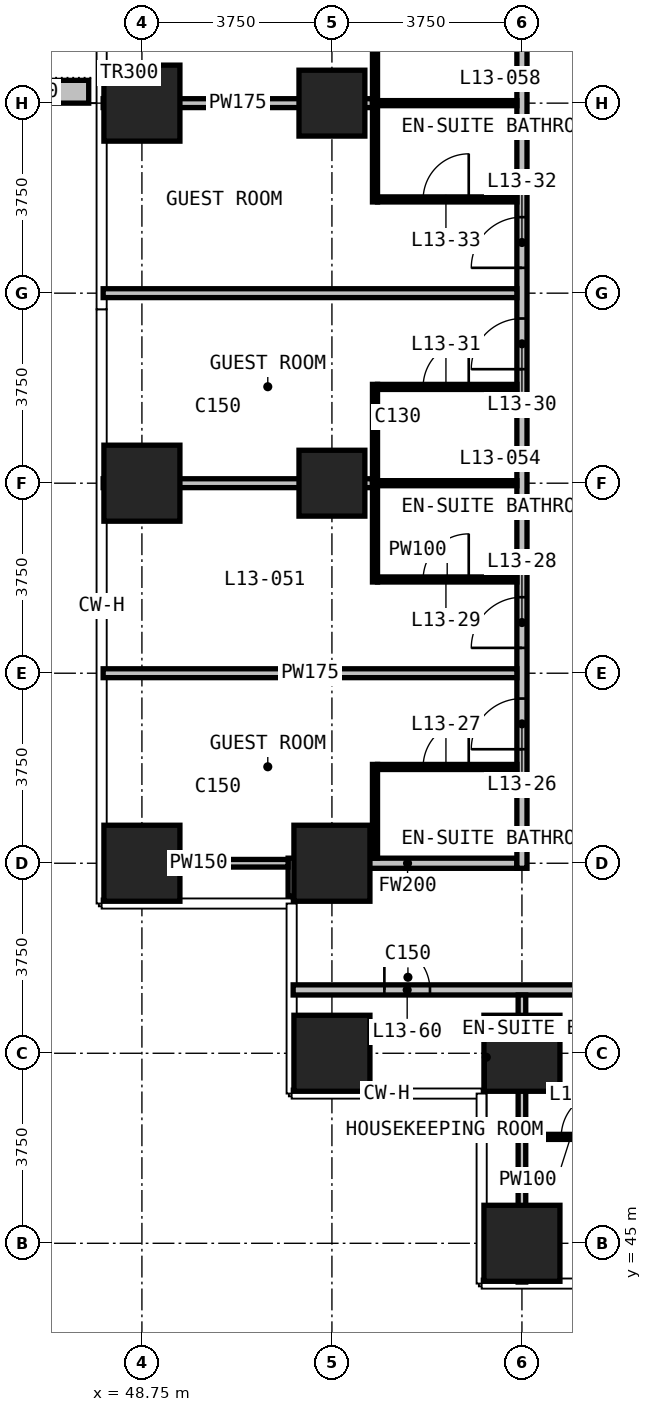
"""IFC4 building model, lengths in metres.
Left out: names, types, materials, properties, quantities, classifications, styles, units other than length and angle.
Written with IfcOpenShell. Run it as: python <this file> out.ifc"""

import sys

from ifc_helpers import new_model, si_unit, direction, frame, frame_2d, origin, origin_2d, place, context, subcontext, project, spatial, rectangle, extrude, element, fill, save


model = new_model("IFC4")
c1 = context("Model", 3, precision=1e-05, world=origin(), true_north=direction((0.0, 1.0)))
c2 = subcontext(c1, "Body", "Model", "MODEL_VIEW")
j1 = project(units=[si_unit("LENGTHUNIT", "METRE"), si_unit("PLANEANGLEUNIT", "RADIAN")], contexts=[c1])
p1 = place(None, origin())
s1 = spatial("IfcSite", under=j1, at=p1, CompositionType="ELEMENT")
p2 = place(p1, origin())
s2 = spatial("IfcBuilding", under=s1, at=p2, CompositionType="ELEMENT")
p3 = place(p2, frame((0.0, 0.0, 62.6)))
s3 = spatial("IfcBuildingStorey", under=s2, at=p3, CompositionType="ELEMENT", Elevation=62.6)
for number, where, z_axis, x_axis in (
    (1, (48.75, 52.5, 0.0), (0.0, 0.0, 1.0), (1.0, 0.0, 0.0)),
    (2, (48.75, 60.0, 0.0), (0.0, 0.0, 1.0), (1.0, 0.0, 0.0)),
    (3, (48.75, 67.5, 0.0), (0.0, 0.0, 1.0), (1.0, 0.0, 0.0)),
    (4, (52.5, 48.75, 0.0), (0.0, 0.0, 1.0), (1.0, 0.0, 0.0)),
    (5, (52.5, 52.5, 0.0), (0.0, 0.0, 1.0), (1.0, 0.0, 0.0)),
):
    element("IfcColumn", number, at=place(p3, frame(where, z_axis=z_axis, x_axis=x_axis)), inside=s3, PredefinedType="COLUMN", context=c2, shape_type="SweptSolid", body=[
        extrude(rectangle(XDim=1.5, YDim=1.5, at=origin_2d()), origin(), (0.0, 0.0, 1.0), 3.3),
    ])
for number, where, z_axis, x_axis in (
    (6, (52.5, 60.0, 0.0), (0.0, 0.0, 1.0), (1.0, 0.0, 0.0)),
    (7, (52.5, 67.5, 0.0), (0.0, 0.0, 1.0), (1.0, 0.0, 0.0)),
):
    element("IfcColumn", number, at=place(p3, frame(where, z_axis=z_axis, x_axis=x_axis)), inside=s3, PredefinedType="COLUMN", context=c2, shape_type="SweptSolid", body=[
        extrude(rectangle(XDim=1.3, YDim=1.3, at=origin_2d()), origin(), (0.0, 0.0, 1.0), 3.3),
    ])
for number, where, z_axis, x_axis in (
    (8, (56.25, 45.0, 0.0), (0.0, 0.0, 1.0), (1.0, 0.0, 0.0)),
    (9, (56.25, 48.75, 0.0), (0.0, 0.0, 1.0), (1.0, 0.0, 0.0)),
):
    element("IfcColumn", number, at=place(p3, frame(where, z_axis=z_axis, x_axis=x_axis)), inside=s3, PredefinedType="COLUMN", context=c2, shape_type="SweptSolid", body=[
        extrude(rectangle(XDim=1.5, YDim=1.5, at=origin_2d()), origin(), (0.0, 0.0, 1.0), 3.3),
    ])
p4 = place(p3, frame((47.7, 67.725, 0.0), z_axis=(0.0, 0.0, 1.0), x_axis=(-1.0, 0.0, 0.0)))
e10 = element("IfcWall", 10, at=p4, inside=s3, PredefinedType="USERDEFINED", context=c2, shape_type="SweptSolid", body=[
    extrude(rectangle(XDim=2.35, YDim=0.45, at=frame_2d((1.175, 0.0))), origin(), (0.0, 0.0, 1.0), 1.1),
])
p5 = place(p3, frame((51.735, 50.0, 0.0), z_axis=(0.0, 0.0, 1.0), x_axis=(1.0, 0.0, 0.0)))
e11 = element("IfcWall", 11, at=p5, inside=s3, PredefinedType="PARTITIONING", context=c2, shape_type="SweptSolid", body=[
    extrude(rectangle(XDim=46.53, YDim=0.2, at=frame_2d((23.265, 0.0))), origin(), (0.0, 0.0, 1.0), 3.0),
])
p6 = place(p5, frame((6.765, 0.0, 0.0)))
e12 = element("IfcOpeningElement", 12, at=p6, cuts=e11, PredefinedType="OPENING", context=c2, shape_type="SweptSolid", body=[
    extrude(rectangle(XDim=1.0, YDim=2.2, at=frame_2d((0.5, 1.1))), frame((0.0, 0.11, 0.0), z_axis=(0.0, -1.0, 0.0), x_axis=(1.0, 0.0, 0.0)), (0.0, 0.0, 1.0), 0.22),
])
p7 = place(p5, frame((10.515, 0.0, 0.0)))
e13 = element("IfcOpeningElement", 13, at=p7, cuts=e11, PredefinedType="OPENING", context=c2, shape_type="SweptSolid", body=[
    extrude(rectangle(XDim=1.0, YDim=2.2, at=frame_2d((0.5, 1.1))), frame((0.0, 0.11, 0.0), z_axis=(0.0, -1.0, 0.0), x_axis=(1.0, 0.0, 0.0)), (0.0, 0.0, 1.0), 0.22),
])
p8 = place(p5, frame((12.515, 0.0, 0.0)))
e14 = element("IfcOpeningElement", 14, at=p8, cuts=e11, PredefinedType="OPENING", context=c2, shape_type="SweptSolid", body=[
    extrude(rectangle(XDim=1.0, YDim=2.2, at=frame_2d((0.5, 1.1))), frame((0.0, 0.11, 0.0), z_axis=(0.0, -1.0, 0.0), x_axis=(1.0, 0.0, 0.0)), (0.0, 0.0, 1.0), 0.22),
])
p9 = place(p5, frame((18.015, 0.0, 0.0)))
e15 = element("IfcOpeningElement", 15, at=p9, cuts=e11, PredefinedType="OPENING", context=c2, shape_type="SweptSolid", body=[
    extrude(rectangle(XDim=1.0, YDim=2.2, at=frame_2d((0.5, 1.1))), frame((0.0, 0.11, 0.0), z_axis=(0.0, -1.0, 0.0), x_axis=(1.0, 0.0, 0.0)), (0.0, 0.0, 1.0), 0.22),
])
p10 = place(p5, frame((20.015, 0.0, 0.0)))
e16 = element("IfcOpeningElement", 16, at=p10, cuts=e11, PredefinedType="OPENING", context=c2, shape_type="SweptSolid", body=[
    extrude(rectangle(XDim=1.0, YDim=2.2, at=frame_2d((0.5, 1.1))), frame((0.0, 0.11, 0.0), z_axis=(0.0, -1.0, 0.0), x_axis=(1.0, 0.0, 0.0)), (0.0, 0.0, 1.0), 0.22),
])
p11 = place(p5, frame((25.515, 0.0, 0.0)))
e17 = element("IfcOpeningElement", 17, at=p11, cuts=e11, PredefinedType="OPENING", context=c2, shape_type="SweptSolid", body=[
    extrude(rectangle(XDim=1.0, YDim=2.2, at=frame_2d((0.5, 1.1))), frame((0.0, 0.11, 0.0), z_axis=(0.0, -1.0, 0.0), x_axis=(1.0, 0.0, 0.0)), (0.0, 0.0, 1.0), 0.22),
])
p12 = place(p5, frame((27.515, 0.0, 0.0)))
e18 = element("IfcOpeningElement", 18, at=p12, cuts=e11, PredefinedType="OPENING", context=c2, shape_type="SweptSolid", body=[
    extrude(rectangle(XDim=1.0, YDim=2.2, at=frame_2d((0.5, 1.1))), frame((0.0, 0.11, 0.0), z_axis=(0.0, -1.0, 0.0), x_axis=(1.0, 0.0, 0.0)), (0.0, 0.0, 1.0), 0.22),
])
p13 = place(p5, frame((33.015, 0.0, 0.0)))
e19 = element("IfcOpeningElement", 19, at=p13, cuts=e11, PredefinedType="OPENING", context=c2, shape_type="SweptSolid", body=[
    extrude(rectangle(XDim=1.0, YDim=2.2, at=frame_2d((0.5, 1.1))), frame((0.0, 0.11, 0.0), z_axis=(0.0, -1.0, 0.0), x_axis=(1.0, 0.0, 0.0)), (0.0, 0.0, 1.0), 0.22),
])
p14 = place(p5, frame((35.015, 0.0, 0.0)))
e20 = element("IfcOpeningElement", 20, at=p14, cuts=e11, PredefinedType="OPENING", context=c2, shape_type="SweptSolid", body=[
    extrude(rectangle(XDim=1.0, YDim=2.2, at=frame_2d((0.5, 1.1))), frame((0.0, 0.11, 0.0), z_axis=(0.0, -1.0, 0.0), x_axis=(1.0, 0.0, 0.0)), (0.0, 0.0, 1.0), 0.22),
])
p15 = place(p5, frame((38.765, 0.0, 0.0)))
e21 = element("IfcOpeningElement", 21, at=p15, cuts=e11, PredefinedType="OPENING", context=c2, shape_type="SweptSolid", body=[
    extrude(rectangle(XDim=1.0, YDim=2.2, at=frame_2d((0.5, 1.1))), frame((0.0, 0.11, 0.0), z_axis=(0.0, -1.0, 0.0), x_axis=(1.0, 0.0, 0.0)), (0.0, 0.0, 1.0), 0.22),
])
p16 = place(p5, frame((1.8, 0.0, 0.0)))
e22 = element("IfcOpeningElement", 22, at=p16, cuts=e11, PredefinedType="OPENING", context=c2, shape_type="SweptSolid", body=[
    extrude(rectangle(XDim=0.9, YDim=2.2, at=frame_2d((0.45, 1.1))), frame((0.0, 0.11, 0.0), z_axis=(0.0, -1.0, 0.0), x_axis=(1.0, 0.0, 0.0)), (0.0, 0.0, 1.0), 0.22),
])
p17 = place(p5, frame((43.815, 0.0, 0.0)))
e23 = element("IfcOpeningElement", 23, at=p17, cuts=e11, PredefinedType="OPENING", context=c2, shape_type="SweptSolid", body=[
    extrude(rectangle(XDim=0.9, YDim=2.2, at=frame_2d((0.45, 1.1))), frame((0.0, 0.11, 0.0), z_axis=(0.0, -1.0, 0.0), x_axis=(1.0, 0.0, 0.0)), (0.0, 0.0, 1.0), 0.22),
])
p18 = place(p3, frame((51.835, 52.5, 0.0), z_axis=(0.0, 0.0, 1.0), x_axis=(1.0, 0.0, 0.0)))
e24 = element("IfcWall", 24, at=p18, inside=s3, PredefinedType="PARTITIONING", context=c2, shape_type="SweptSolid", body=[
    extrude(rectangle(XDim=4.315, YDim=0.2, at=frame_2d((2.157, 0.0))), origin(), (0.0, 0.0, 1.0), 3.0),
])
p19 = place(p3, frame((51.735, 51.855, 0.0), z_axis=(0.0, 0.0, 1.0), x_axis=(0.0, 1.0, 0.0)))
e25 = element("IfcWall", 25, at=p19, inside=s3, PredefinedType="PARTITIONING", context=c2, shape_type="SweptSolid", body=[
    extrude(rectangle(XDim=0.745, YDim=0.2, at=frame_2d((0.373, 0.0))), origin(), (0.0, 0.0, 1.0), 3.0),
])
p20 = place(p3, frame((56.25, 52.4, 0.0), z_axis=(0.0, 0.0, 1.0), x_axis=(0.0, 1.0, 0.0)))
e26 = element("IfcWall", 26, at=p20, inside=s3, PredefinedType="PARTITIONING", context=c2, shape_type="SweptSolid", body=[
    extrude(rectangle(XDim=33.925, YDim=0.2, at=frame_2d((16.962, 0.0))), origin(), (0.0, 0.0, 1.0), 3.0),
])
p21 = place(p20, frame((2.35, 0.0, 0.0)))
e27 = element("IfcOpeningElement", 27, at=p21, cuts=e26, PredefinedType="OPENING", context=c2, shape_type="SweptSolid", body=[
    extrude(rectangle(XDim=1.0, YDim=2.2, at=frame_2d((0.5, 1.1))), frame((0.0, 0.11, 0.0), z_axis=(0.0, -1.0, 0.0), x_axis=(1.0, 0.0, 0.0)), (0.0, 0.0, 1.0), 0.22),
])
p22 = place(p20, frame((4.35, 0.0, 0.0)))
e28 = element("IfcOpeningElement", 28, at=p22, cuts=e26, PredefinedType="OPENING", context=c2, shape_type="SweptSolid", body=[
    extrude(rectangle(XDim=1.0, YDim=2.2, at=frame_2d((0.5, 1.1))), frame((0.0, 0.11, 0.0), z_axis=(0.0, -1.0, 0.0), x_axis=(1.0, 0.0, 0.0)), (0.0, 0.0, 1.0), 0.22),
])
p23 = place(p20, frame((9.85, 0.0, 0.0)))
e29 = element("IfcOpeningElement", 29, at=p23, cuts=e26, PredefinedType="OPENING", context=c2, shape_type="SweptSolid", body=[
    extrude(rectangle(XDim=1.0, YDim=2.2, at=frame_2d((0.5, 1.1))), frame((0.0, 0.11, 0.0), z_axis=(0.0, -1.0, 0.0), x_axis=(1.0, 0.0, 0.0)), (0.0, 0.0, 1.0), 0.22),
])
p24 = place(p20, frame((11.85, 0.0, 0.0)))
e30 = element("IfcOpeningElement", 30, at=p24, cuts=e26, PredefinedType="OPENING", context=c2, shape_type="SweptSolid", body=[
    extrude(rectangle(XDim=1.0, YDim=2.2, at=frame_2d((0.5, 1.1))), frame((0.0, 0.11, 0.0), z_axis=(0.0, -1.0, 0.0), x_axis=(1.0, 0.0, 0.0)), (0.0, 0.0, 1.0), 0.22),
])
p25 = place(p20, frame((17.35, 0.0, 0.0)))
e31 = element("IfcOpeningElement", 31, at=p25, cuts=e26, PredefinedType="OPENING", context=c2, shape_type="SweptSolid", body=[
    extrude(rectangle(XDim=1.0, YDim=2.2, at=frame_2d((0.5, 1.1))), frame((0.0, 0.11, 0.0), z_axis=(0.0, -1.0, 0.0), x_axis=(1.0, 0.0, 0.0)), (0.0, 0.0, 1.0), 0.22),
])
p26 = place(p20, frame((19.35, 0.0, 0.0)))
e32 = element("IfcOpeningElement", 32, at=p26, cuts=e26, PredefinedType="OPENING", context=c2, shape_type="SweptSolid", body=[
    extrude(rectangle(XDim=1.0, YDim=2.2, at=frame_2d((0.5, 1.1))), frame((0.0, 0.11, 0.0), z_axis=(0.0, -1.0, 0.0), x_axis=(1.0, 0.0, 0.0)), (0.0, 0.0, 1.0), 0.22),
])
p27 = place(p20, frame((24.85, 0.0, 0.0)))
e33 = element("IfcOpeningElement", 33, at=p27, cuts=e26, PredefinedType="OPENING", context=c2, shape_type="SweptSolid", body=[
    extrude(rectangle(XDim=1.0, YDim=2.2, at=frame_2d((0.5, 1.1))), frame((0.0, 0.11, 0.0), z_axis=(0.0, -1.0, 0.0), x_axis=(1.0, 0.0, 0.0)), (0.0, 0.0, 1.0), 0.22),
])
p28 = place(p20, frame((26.85, 0.0, 0.0)))
e34 = element("IfcOpeningElement", 34, at=p28, cuts=e26, PredefinedType="OPENING", context=c2, shape_type="SweptSolid", body=[
    extrude(rectangle(XDim=1.0, YDim=2.2, at=frame_2d((0.5, 1.1))), frame((0.0, 0.11, 0.0), z_axis=(0.0, -1.0, 0.0), x_axis=(1.0, 0.0, 0.0)), (0.0, 0.0, 1.0), 0.22),
])
p29 = place(p20, frame((31.55, 0.0, 0.0)))
e35 = element("IfcOpeningElement", 35, at=p29, cuts=e26, PredefinedType="OPENING", context=c2, shape_type="SweptSolid", body=[
    extrude(rectangle(XDim=0.9, YDim=2.2, at=frame_2d((0.45, 1.1))), frame((0.0, 0.11, 0.0), z_axis=(0.0, -1.0, 0.0), x_axis=(1.0, 0.0, 0.0)), (0.0, 0.0, 1.0), 0.22),
])
p30 = place(p3, frame((47.985, 56.25, 0.0), z_axis=(0.0, 0.0, 1.0), x_axis=(1.0, 0.0, 0.0)))
e36 = element("IfcWall", 36, at=p30, inside=s3, PredefinedType="PARTITIONING", context=c2, shape_type="SweptSolid", body=[
    extrude(rectangle(XDim=8.165, YDim=0.175, at=frame_2d((4.083, 0.0))), origin(), (0.0, 0.0, 1.0), 3.0),
])
p31 = place(p3, frame((47.985, 60.0, 0.0), z_axis=(0.0, 0.0, 1.0), x_axis=(1.0, 0.0, 0.0)))
e37 = element("IfcWall", 37, at=p31, inside=s3, PredefinedType="PARTITIONING", context=c2, shape_type="SweptSolid", body=[
    extrude(rectangle(XDim=5.315, YDim=0.175, at=frame_2d((2.657, 0.0))), origin(), (0.0, 0.0, 1.0), 3.0),
])
p32 = place(p3, frame((47.985, 63.75, 0.0), z_axis=(0.0, 0.0, 1.0), x_axis=(1.0, 0.0, 0.0)))
e38 = element("IfcWall", 38, at=p32, inside=s3, PredefinedType="PARTITIONING", context=c2, shape_type="SweptSolid", body=[
    extrude(rectangle(XDim=8.165, YDim=0.175, at=frame_2d((4.083, 0.0))), origin(), (0.0, 0.0, 1.0), 3.0),
])
p33 = place(p3, frame((47.985, 67.5, 0.0), z_axis=(0.0, 0.0, 1.0), x_axis=(1.0, 0.0, 0.0)))
e39 = element("IfcWall", 39, at=p33, inside=s3, PredefinedType="PARTITIONING", context=c2, shape_type="SweptSolid", body=[
    extrude(rectangle(XDim=5.315, YDim=0.175, at=frame_2d((2.657, 0.0))), origin(), (0.0, 0.0, 1.0), 3.0),
])
p34 = place(p3, frame((48.105, 52.5, 0.0), z_axis=(0.0, 0.0, 1.0), x_axis=(1.0, 0.0, 0.0)))
e40 = element("IfcWall", 40, at=p34, inside=s3, PredefinedType="PARTITIONING", context=c2, shape_type="SweptSolid", body=[
    extrude(rectangle(XDim=3.53, YDim=0.15, at=frame_2d((1.765, 0.0))), origin(), (0.0, 0.0, 1.0), 3.0),
])
p35 = place(p3, frame((56.25, 44.235, 0.0), z_axis=(0.0, 0.0, 1.0), x_axis=(0.0, 1.0, 0.0)))
e41 = element("IfcWall", 41, at=p35, inside=s3, PredefinedType="PARTITIONING", context=c2, shape_type="SweptSolid", body=[
    extrude(rectangle(XDim=5.665, YDim=0.15, at=frame_2d((2.833, 0.0))), origin(), (0.0, 0.0, 1.0), 3.0),
])
p36 = place(p3, frame((56.325, 47.1, 0.0), z_axis=(0.0, 0.0, 1.0), x_axis=(1.0, 0.0, 0.0)))
e42 = element("IfcWall", 42, at=p36, inside=s3, PredefinedType="PARTITIONING", context=c2, shape_type="SweptSolid", body=[
    extrude(rectangle(XDim=1.775, YDim=0.1, at=frame_2d((0.888, 0.0))), origin(), (0.0, 0.0, 1.0), 3.0),
])
p37 = place(p36, frame((0.7, 0.0, 0.0)))
e43 = element("IfcOpeningElement", 43, at=p37, cuts=e42, PredefinedType="OPENING", context=c2, shape_type="SweptSolid", body=[
    extrude(rectangle(XDim=0.9, YDim=2.2, at=frame_2d((0.45, 1.1))), frame((0.0, 0.06, 0.0), z_axis=(0.0, -1.0, 0.0), x_axis=(1.0, 0.0, 0.0)), (0.0, 0.0, 1.0), 0.12),
])
p38 = place(p3, frame((53.4, 54.4, 0.0), z_axis=(0.0, 0.0, 1.0), x_axis=(1.0, 0.0, 0.0)))
e44 = element("IfcWall", 44, at=p38, inside=s3, PredefinedType="PARTITIONING", context=c2, shape_type="SweptSolid", body=[
    extrude(rectangle(XDim=2.75, YDim=0.1, at=frame_2d((1.375, 0.0))), origin(), (0.0, 0.0, 1.0), 3.0),
])
p39 = place(p38, frame((0.9, 0.0, 0.0)))
e45 = element("IfcOpeningElement", 45, at=p39, cuts=e44, PredefinedType="OPENING", context=c2, shape_type="SweptSolid", body=[
    extrude(rectangle(XDim=0.9, YDim=2.2, at=frame_2d((0.45, 1.1))), frame((0.0, 0.06, 0.0), z_axis=(0.0, -1.0, 0.0), x_axis=(1.0, 0.0, 0.0)), (0.0, 0.0, 1.0), 0.12),
])
p40 = place(p3, frame((53.4, 58.1, 0.0), z_axis=(0.0, 0.0, 1.0), x_axis=(1.0, 0.0, 0.0)))
e46 = element("IfcWall", 46, at=p40, inside=s3, PredefinedType="PARTITIONING", context=c2, shape_type="SweptSolid", body=[
    extrude(rectangle(XDim=2.75, YDim=0.1, at=frame_2d((1.375, 0.0))), origin(), (0.0, 0.0, 1.0), 3.0),
])
p41 = place(p40, frame((0.9, 0.0, 0.0)))
e47 = element("IfcOpeningElement", 47, at=p41, cuts=e46, PredefinedType="OPENING", context=c2, shape_type="SweptSolid", body=[
    extrude(rectangle(XDim=0.9, YDim=2.2, at=frame_2d((0.45, 1.1))), frame((0.0, 0.06, 0.0), z_axis=(0.0, -1.0, 0.0), x_axis=(1.0, 0.0, 0.0)), (0.0, 0.0, 1.0), 0.12),
])
p42 = place(p3, frame((53.4, 60.0, 0.0), z_axis=(0.0, 0.0, 1.0), x_axis=(1.0, 0.0, 0.0)))
e48 = element("IfcWall", 48, at=p42, inside=s3, PredefinedType="PARTITIONING", context=c2, shape_type="SweptSolid", body=[
    extrude(rectangle(XDim=2.75, YDim=0.1, at=frame_2d((1.375, 0.0))), origin(), (0.0, 0.0, 1.0), 3.0),
])
p43 = place(p3, frame((53.4, 61.9, 0.0), z_axis=(0.0, 0.0, 1.0), x_axis=(1.0, 0.0, 0.0)))
e49 = element("IfcWall", 49, at=p43, inside=s3, PredefinedType="PARTITIONING", context=c2, shape_type="SweptSolid", body=[
    extrude(rectangle(XDim=2.75, YDim=0.1, at=frame_2d((1.375, 0.0))), origin(), (0.0, 0.0, 1.0), 3.0),
])
p44 = place(p43, frame((0.9, 0.0, 0.0)))
e50 = element("IfcOpeningElement", 50, at=p44, cuts=e49, PredefinedType="OPENING", context=c2, shape_type="SweptSolid", body=[
    extrude(rectangle(XDim=0.9, YDim=2.2, at=frame_2d((0.45, 1.1))), frame((0.0, 0.06, 0.0), z_axis=(0.0, -1.0, 0.0), x_axis=(1.0, 0.0, 0.0)), (0.0, 0.0, 1.0), 0.12),
])
p45 = place(p3, frame((53.4, 65.6, 0.0), z_axis=(0.0, 0.0, 1.0), x_axis=(1.0, 0.0, 0.0)))
e51 = element("IfcWall", 51, at=p45, inside=s3, PredefinedType="PARTITIONING", context=c2, shape_type="SweptSolid", body=[
    extrude(rectangle(XDim=2.75, YDim=0.1, at=frame_2d((1.375, 0.0))), origin(), (0.0, 0.0, 1.0), 3.0),
])
p46 = place(p45, frame((0.9, 0.0, 0.0)))
e52 = element("IfcOpeningElement", 52, at=p46, cuts=e51, PredefinedType="OPENING", context=c2, shape_type="SweptSolid", body=[
    extrude(rectangle(XDim=0.9, YDim=2.2, at=frame_2d((0.45, 1.1))), frame((0.0, 0.06, 0.0), z_axis=(0.0, -1.0, 0.0), x_axis=(1.0, 0.0, 0.0)), (0.0, 0.0, 1.0), 0.12),
])
p47 = place(p3, frame((53.4, 67.5, 0.0), z_axis=(0.0, 0.0, 1.0), x_axis=(1.0, 0.0, 0.0)))
e53 = element("IfcWall", 53, at=p47, inside=s3, PredefinedType="PARTITIONING", context=c2, shape_type="SweptSolid", body=[
    extrude(rectangle(XDim=2.75, YDim=0.1, at=frame_2d((1.375, 0.0))), origin(), (0.0, 0.0, 1.0), 3.0),
])
p48 = place(p3, frame((53.35, 52.6, 0.0), z_axis=(0.0, 0.0, 1.0), x_axis=(0.0, 1.0, 0.0)))
e54 = element("IfcWall", 54, at=p48, inside=s3, PredefinedType="PARTITIONING", context=c2, shape_type="SweptSolid", body=[
    extrude(rectangle(XDim=1.85, YDim=0.1, at=frame_2d((0.925, 0.0))), origin(), (0.0, 0.0, 1.0), 3.0),
])
for number, where, z_axis, x_axis in (
    (55, (53.35, 58.05, 0.0), (0.0, 0.0, 1.0), (0.0, 1.0, 0.0)),
    (56, (53.35, 65.55, 0.0), (0.0, 0.0, 1.0), (0.0, 1.0, 0.0)),
):
    element("IfcWall", number, at=place(p3, frame(where, z_axis=z_axis, x_axis=x_axis)), inside=s3, PredefinedType="PARTITIONING", context=c2, shape_type="SweptSolid", body=[
        extrude(rectangle(XDim=3.9, YDim=0.1, at=frame_2d((1.95, 0.0))), origin(), (0.0, 0.0, 1.0), 3.0),
    ])
p49 = place(p37, origin())
e57 = element("IfcDoor", 57, at=p49, inside=s3, OperationType="SINGLE_SWING_RIGHT", PredefinedType="DOOR", context=c2, shape_type="SweptSolid", body=[
    extrude(rectangle(XDim=0.9, YDim=2.2, at=frame_2d((0.45, 1.1))), frame((0.0, 0.025, 0.0), z_axis=(0.0, -1.0, 0.0), x_axis=(1.0, 0.0, 0.0)), (0.0, 0.0, 1.0), 0.05),
])
fill(e43, e57)
p50 = place(p21, origin())
e58 = element("IfcDoor", 58, at=p50, inside=s3, OperationType="SINGLE_SWING_RIGHT", PredefinedType="DOOR", context=c2, shape_type="SweptSolid", body=[
    extrude(rectangle(XDim=1.0, YDim=2.2, at=frame_2d((0.5, 1.1))), frame((0.0, 0.025, 0.0), z_axis=(0.0, -1.0, 0.0), x_axis=(1.0, 0.0, 0.0)), (0.0, 0.0, 1.0), 0.05),
])
fill(e27, e58)
p51 = place(p39, origin())
e59 = element("IfcDoor", 59, at=p51, inside=s3, OperationType="SINGLE_SWING_RIGHT", PredefinedType="DOOR", context=c2, shape_type="SweptSolid", body=[
    extrude(rectangle(XDim=0.9, YDim=2.2, at=frame_2d((0.45, 1.1))), frame((0.0, 0.025, 0.0), z_axis=(0.0, -1.0, 0.0), x_axis=(1.0, 0.0, 0.0)), (0.0, 0.0, 1.0), 0.05),
])
fill(e45, e59)
p52 = place(p22, origin())
e60 = element("IfcDoor", 60, at=p52, inside=s3, OperationType="SINGLE_SWING_LEFT", PredefinedType="DOOR", context=c2, shape_type="SweptSolid", body=[
    extrude(rectangle(XDim=1.0, YDim=2.2, at=frame_2d((0.5, 1.1))), frame((0.0, 0.025, 0.0), z_axis=(0.0, -1.0, 0.0), x_axis=(1.0, 0.0, 0.0)), (0.0, 0.0, 1.0), 0.05),
])
fill(e28, e60)
p53 = place(p41, origin())
e61 = element("IfcDoor", 61, at=p53, inside=s3, OperationType="SINGLE_SWING_RIGHT", PredefinedType="DOOR", context=c2, shape_type="SweptSolid", body=[
    extrude(rectangle(XDim=0.9, YDim=2.2, at=frame_2d((0.45, 1.1))), frame((0.0, 0.025, 0.0), z_axis=(0.0, -1.0, 0.0), x_axis=(1.0, 0.0, 0.0)), (0.0, 0.0, 1.0), 0.05),
])
fill(e47, e61)
p54 = place(p23, origin())
e62 = element("IfcDoor", 62, at=p54, inside=s3, OperationType="SINGLE_SWING_LEFT", PredefinedType="DOOR", context=c2, shape_type="SweptSolid", body=[
    extrude(rectangle(XDim=1.0, YDim=2.2, at=frame_2d((0.5, 1.1))), frame((0.0, 0.025, 0.0), z_axis=(0.0, -1.0, 0.0), x_axis=(1.0, 0.0, 0.0)), (0.0, 0.0, 1.0), 0.05),
])
fill(e29, e62)
p55 = place(p44, origin())
e63 = element("IfcDoor", 63, at=p55, inside=s3, OperationType="SINGLE_SWING_RIGHT", PredefinedType="DOOR", context=c2, shape_type="SweptSolid", body=[
    extrude(rectangle(XDim=0.9, YDim=2.2, at=frame_2d((0.45, 1.1))), frame((0.0, 0.025, 0.0), z_axis=(0.0, -1.0, 0.0), x_axis=(1.0, 0.0, 0.0)), (0.0, 0.0, 1.0), 0.05),
])
fill(e50, e63)
p56 = place(p24, origin())
e64 = element("IfcDoor", 64, at=p56, inside=s3, OperationType="SINGLE_SWING_RIGHT", PredefinedType="DOOR", context=c2, shape_type="SweptSolid", body=[
    extrude(rectangle(XDim=1.0, YDim=2.2, at=frame_2d((0.5, 1.1))), frame((0.0, 0.025, 0.0), z_axis=(0.0, -1.0, 0.0), x_axis=(1.0, 0.0, 0.0)), (0.0, 0.0, 1.0), 0.05),
])
fill(e30, e64)
p57 = place(p46, origin())
e65 = element("IfcDoor", 65, at=p57, inside=s3, OperationType="SINGLE_SWING_RIGHT", PredefinedType="DOOR", context=c2, shape_type="SweptSolid", body=[
    extrude(rectangle(XDim=0.9, YDim=2.2, at=frame_2d((0.45, 1.1))), frame((0.0, 0.025, 0.0), z_axis=(0.0, -1.0, 0.0), x_axis=(1.0, 0.0, 0.0)), (0.0, 0.0, 1.0), 0.05),
])
fill(e52, e65)
p58 = place(p16, origin())
e66 = element("IfcDoor", 66, at=p58, inside=s3, OperationType="SINGLE_SWING_RIGHT", PredefinedType="DOOR", context=c2, shape_type="SweptSolid", body=[
    extrude(rectangle(XDim=0.9, YDim=2.2, at=frame_2d((0.45, 1.1))), frame((0.0, 0.025, 0.0), z_axis=(0.0, -1.0, 0.0), x_axis=(1.0, 0.0, 0.0)), (0.0, 0.0, 1.0), 0.05),
])
fill(e22, e66)
save(model, sys.argv[1])
